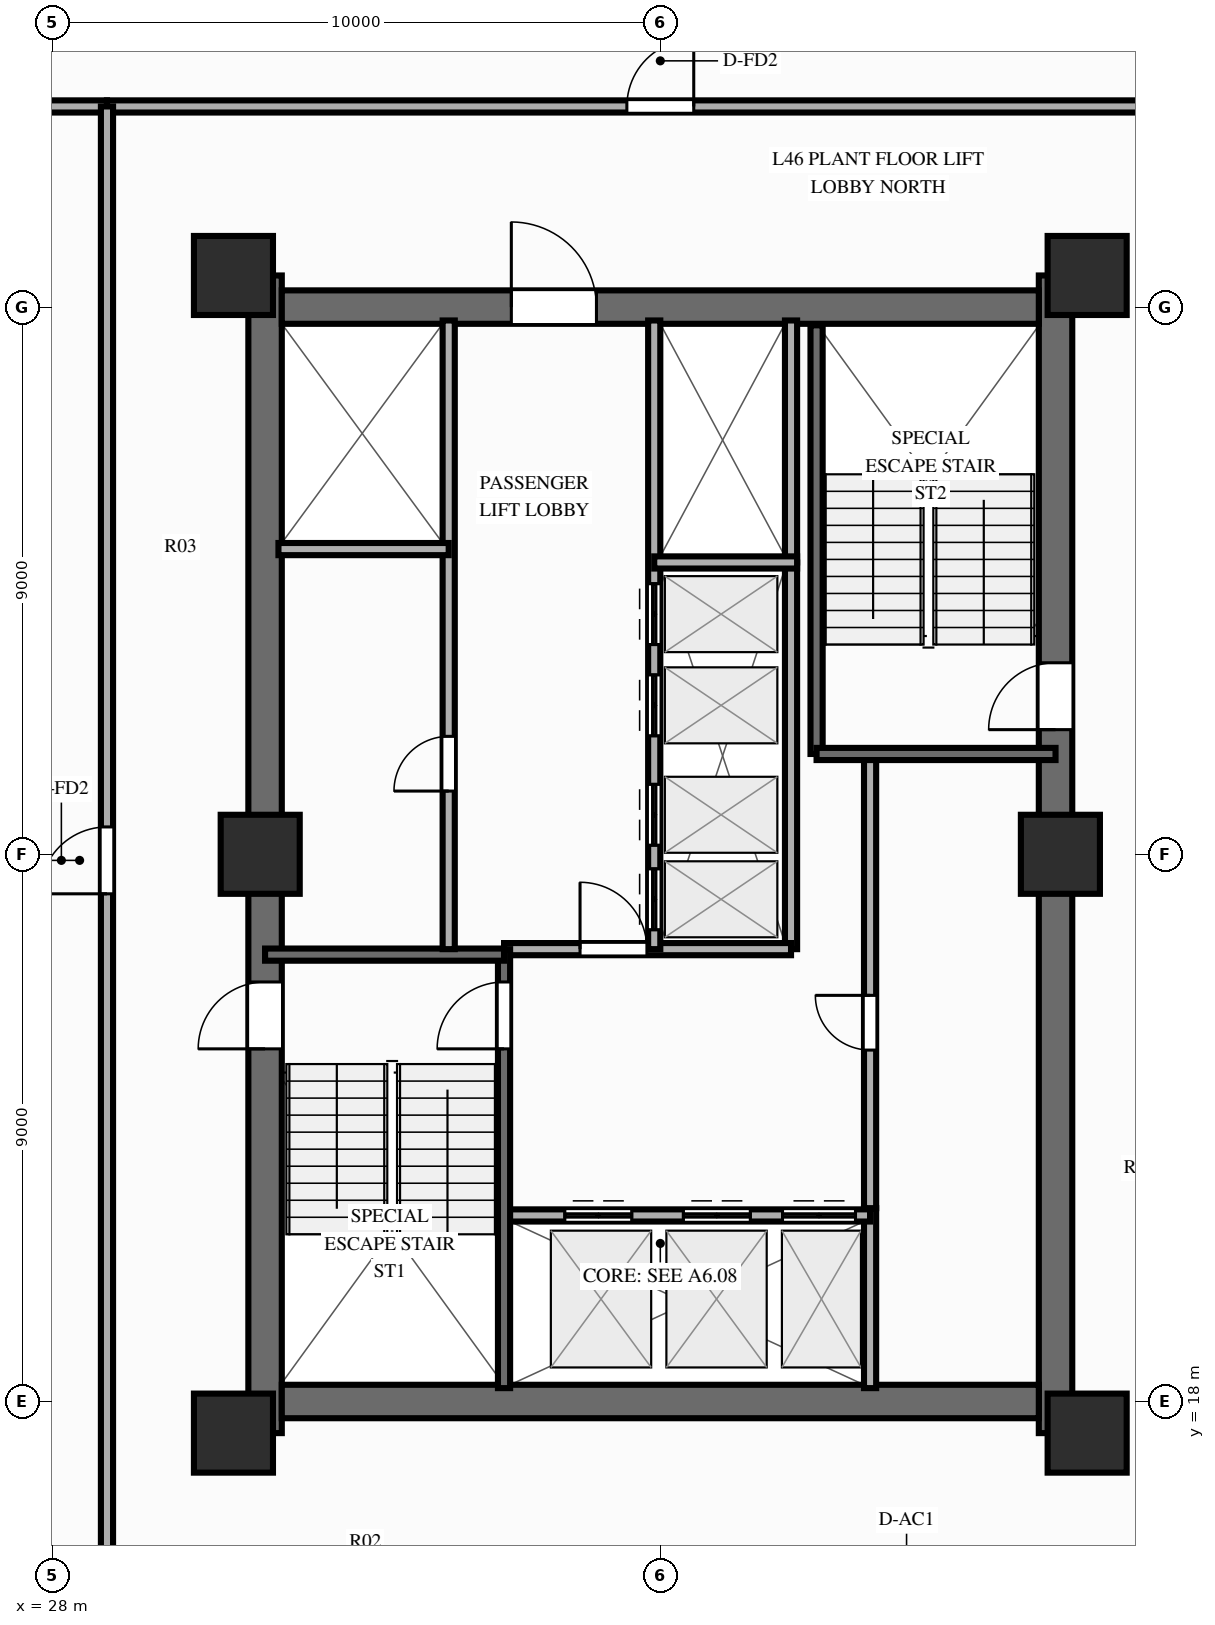
"""IFC4 building model, lengths in metres.
Left out: names, types, materials, properties, quantities, classifications, styles, units other than length and angle.
Written with IfcOpenShell. Run it as: python <this file> out.ifc"""

import sys

from ifc_helpers import new_model, si_unit, direction, frame, frame_2d, origin, origin_2d, place, context, subcontext, project, spatial, rectangle, extrude, source, transform, mapped, element, fill, save


model = new_model("IFC4")
c1 = context("Model", 3, precision=1e-05, world=origin(), true_north=direction((0.0, 1.0)))
c2 = subcontext(c1, "Body", "Model", "MODEL_VIEW")
j1 = project(units=[si_unit("LENGTHUNIT", "METRE"), si_unit("PLANEANGLEUNIT", "RADIAN")], contexts=[c1])
p1 = place(None, origin())
s1 = spatial("IfcSite", under=j1, at=p1, CompositionType="ELEMENT")
p2 = place(p1, origin())
s2 = spatial("IfcBuilding", under=s1, at=p2, CompositionType="ELEMENT")
p3 = place(p2, frame((0.0, 0.0, 144.75)))
s3 = spatial("IfcBuildingStorey", under=s2, at=p3, CompositionType="ELEMENT", Elevation=144.75)
p4 = place(p3, frame((31.5, 17.48, 0.0), z_axis=(0.0, 0.0, 1.0), x_axis=(0.0, 1.0, 0.0)))
e1 = element("IfcWall", 1, at=p4, inside=s3, PredefinedType="SHEAR", context=c2, shape_type="SweptSolid", body=[
    extrude(rectangle(XDim=19.04, YDim=0.55, at=frame_2d((9.52, 0.0))), origin(), (0.0, 0.0, 1.0), 3.95),
])
p5 = place(p4, frame((6.32, 0.0, 0.0)))
e2 = element("IfcOpeningElement", 2, at=p5, cuts=e1, PredefinedType="OPENING", context=c2, shape_type="SweptSolid", body=[
    extrude(rectangle(XDim=1.1, YDim=2.15, at=frame_2d((0.55, 1.075))), frame((0.0, 0.287, 0.0), z_axis=(0.0, -1.0, 0.0), x_axis=(1.0, 0.0, 0.0)), (0.0, 0.0, 1.0), 0.574),
])
p6 = place(p3, frame((44.5, 17.48, 0.0), z_axis=(0.0, 0.0, 1.0), x_axis=(0.0, 1.0, 0.0)))
e3 = element("IfcWall", 3, at=p6, inside=s3, PredefinedType="SHEAR", context=c2, shape_type="SweptSolid", body=[
    extrude(rectangle(XDim=19.04, YDim=0.55, at=frame_2d((9.52, 0.0))), origin(), (0.0, 0.0, 1.0), 3.95),
])
p7 = place(p6, frame((12.67, 0.0, 0.0), z_axis=(0.0, 0.0, 1.0), x_axis=(-1.0, 0.0, 0.0)))
e4 = element("IfcOpeningElement", 4, at=p7, cuts=e3, PredefinedType="OPENING", context=c2, shape_type="SweptSolid", body=[
    extrude(rectangle(XDim=1.1, YDim=2.15, at=frame_2d((0.55, 1.075))), frame((0.0, 0.287, 0.0), z_axis=(0.0, -1.0, 0.0), x_axis=(1.0, 0.0, 0.0)), (0.0, 0.0, 1.0), 0.574),
])
p8 = place(p3, frame((31.775, 18.0, 0.0), z_axis=(0.0, 0.0, 1.0), x_axis=(1.0, 0.0, 0.0)))
e5 = element("IfcWall", 5, at=p8, inside=s3, PredefinedType="SHEAR", context=c2, shape_type="SweptSolid", body=[
    extrude(rectangle(XDim=12.45, YDim=0.55, at=frame_2d((6.225, 0.0))), origin(), (0.0, 0.0, 1.0), 3.95),
])
p9 = place(p3, frame((31.775, 36.0, 0.0), z_axis=(0.0, 0.0, 1.0), x_axis=(1.0, 0.0, 0.0)))
e6 = element("IfcWall", 6, at=p9, inside=s3, PredefinedType="SHEAR", context=c2, shape_type="SweptSolid", body=[
    extrude(rectangle(XDim=12.45, YDim=0.55, at=frame_2d((6.225, 0.0))), origin(), (0.0, 0.0, 1.0), 3.95),
])
p10 = place(p9, frame((5.175, 0.0, 0.0), z_axis=(0.0, 0.0, 1.0), x_axis=(-1.0, 0.0, 0.0)))
e7 = element("IfcOpeningElement", 7, at=p10, cuts=e6, PredefinedType="OPENING", context=c2, shape_type="SweptSolid", body=[
    extrude(rectangle(XDim=1.4, YDim=2.15, at=frame_2d((0.7, 1.075))), frame((0.0, 0.287, 0.0), z_axis=(0.0, -1.0, 0.0), x_axis=(1.0, 0.0, 0.0)), (0.0, 0.0, 1.0), 0.574),
])
m1 = source(origin(), c2, "Body", "SweptSolid", [
    extrude(rectangle(XDim=1.3, YDim=1.3, at=origin_2d()), origin(), (0.0, 0.0, 1.0), 3.95),
])
for number, where, z_axis, x_axis in (
    (8, (30.98, 17.48, 0.0), (0.0, 0.0, 1.0), (1.0, 0.0, 0.0)),
    (9, (45.02, 17.48, 0.0), (0.0, 0.0, 1.0), (1.0, 0.0, 0.0)),
    (10, (30.98, 36.52, 0.0), (0.0, 0.0, 1.0), (1.0, 0.0, 0.0)),
    (11, (45.02, 36.52, 0.0), (0.0, 0.0, 1.0), (1.0, 0.0, 0.0)),
    (12, (31.42, 27.0, 0.0), (0.0, 0.0, 1.0), (1.0, 0.0, 0.0)),
    (13, (44.58, 27.0, 0.0), (0.0, 0.0, 1.0), (1.0, 0.0, 0.0)),
):
    element("IfcColumn", number, at=place(p3, frame(where, z_axis=z_axis, x_axis=x_axis)), inside=s3, PredefinedType="COLUMN", context=c2, shape_type="MappedRepresentation", body=[
        mapped(m1, transform((0.0, 0.0, 0.0), scale=1.0)),
    ])
p11 = place(p3, frame((41.45, 18.22, 0.0), z_axis=(0.0, 0.0, 1.0), x_axis=(0.0, 1.0, 0.0)))
e14 = element("IfcWall", 14, at=p11, inside=s3, PredefinedType="PARTITIONING", context=c2, shape_type="SweptSolid", body=[
    extrude(rectangle(XDim=2.96, YDim=0.2, at=frame_2d((1.48, 0.0))), origin(), (0.0, 0.0, 1.0), 3.61),
])
p12 = place(p3, frame((41.45, 21.18, 0.0), z_axis=(0.0, 0.0, 1.0), x_axis=(0.0, 1.0, 0.0)))
e15 = element("IfcWall", 15, at=p12, inside=s3, PredefinedType="PARTITIONING", context=c2, shape_type="SweptSolid", body=[
    extrude(rectangle(XDim=7.42, YDim=0.2, at=frame_2d((3.71, 0.0))), origin(), (0.0, 0.0, 1.0), 3.61),
])
p13 = place(p12, frame((2.6, 0.0, 0.0)))
e16 = element("IfcOpeningElement", 16, at=p13, cuts=e15, PredefinedType="OPENING", context=c2, shape_type="SweptSolid", body=[
    extrude(rectangle(XDim=0.9, YDim=2.1, at=frame_2d((0.45, 1.05))), frame((0.0, 0.112, 0.0), z_axis=(0.0, -1.0, 0.0), x_axis=(1.0, 0.0, 0.0)), (0.0, 0.0, 1.0), 0.224),
])
p14 = place(p3, frame((40.15, 25.44, 0.0), z_axis=(0.0, 0.0, 1.0), x_axis=(0.0, 1.0, 0.0)))
e17 = element("IfcWall", 17, at=p14, inside=s3, PredefinedType="PARTITIONING", context=c2, shape_type="SweptSolid", body=[
    extrude(rectangle(XDim=6.36, YDim=0.2, at=frame_2d((3.18, 0.0))), origin(), (0.0, 0.0, 1.0), 3.61),
])
p15 = place(p3, frame((40.15, 31.8, 0.0), z_axis=(0.0, 0.0, 1.0), x_axis=(0.0, 1.0, 0.0)))
e18 = element("IfcWall", 18, at=p15, inside=s3, PredefinedType="PARTITIONING", context=c2, shape_type="SweptSolid", body=[
    extrude(rectangle(XDim=3.98, YDim=0.2, at=frame_2d((1.99, 0.0))), origin(), (0.0, 0.0, 1.0), 3.61),
])
p16 = place(p3, frame((35.43, 21.06, 0.0), z_axis=(0.0, 0.0, 1.0), x_axis=(1.0, 0.0, 0.0)))
e19 = element("IfcWall", 19, at=p16, inside=s3, PredefinedType="PARTITIONING", context=c2, shape_type="SweptSolid", body=[
    extrude(rectangle(XDim=6.02, YDim=0.2, at=frame_2d((3.01, 0.0))), origin(), (0.0, 0.0, 1.0), 3.61),
])
p17 = place(p16, frame((1.0, 0.0, 0.0)))
e20 = element("IfcOpeningElement", 20, at=p17, cuts=e19, PredefinedType="OPENING", context=c2, shape_type="SweptSolid", body=[
    extrude(rectangle(XDim=1.1, YDim=2.15, at=frame_2d((0.55, 1.075))), frame((0.0, 0.112, 0.0), z_axis=(0.0, -1.0, 0.0), x_axis=(1.0, 0.0, 0.0)), (0.0, 0.0, 1.0), 0.224),
])
p18 = place(p16, frame((2.95, 0.0, 0.0)))
e21 = element("IfcOpeningElement", 21, at=p18, cuts=e19, PredefinedType="OPENING", context=c2, shape_type="SweptSolid", body=[
    extrude(rectangle(XDim=1.1, YDim=2.15, at=frame_2d((0.55, 1.075))), frame((0.0, 0.112, 0.0), z_axis=(0.0, -1.0, 0.0), x_axis=(1.0, 0.0, 0.0)), (0.0, 0.0, 1.0), 0.224),
])
p19 = place(p16, frame((4.58, 0.0, 0.0)))
e22 = element("IfcOpeningElement", 22, at=p19, cuts=e19, PredefinedType="OPENING", context=c2, shape_type="SweptSolid", body=[
    extrude(rectangle(XDim=1.2, YDim=2.15, at=frame_2d((0.6, 1.075))), frame((0.0, 0.112, 0.0), z_axis=(0.0, -1.0, 0.0), x_axis=(1.0, 0.0, 0.0)), (0.0, 0.0, 1.0), 0.224),
])
p20 = place(p3, frame((35.43, 25.44, 0.0), z_axis=(0.0, 0.0, 1.0), x_axis=(1.0, 0.0, 0.0)))
e23 = element("IfcWall", 23, at=p20, inside=s3, PredefinedType="PARTITIONING", context=c2, shape_type="SweptSolid", body=[
    extrude(rectangle(XDim=4.72, YDim=0.2, at=frame_2d((2.36, 0.0))), origin(), (0.0, 0.0, 1.0), 3.61),
])
p21 = place(p20, frame((1.25, 0.0, 0.0)))
e24 = element("IfcOpeningElement", 24, at=p21, cuts=e23, PredefinedType="OPENING", context=c2, shape_type="SweptSolid", body=[
    extrude(rectangle(XDim=1.1, YDim=2.15, at=frame_2d((0.55, 1.075))), frame((0.0, 0.112, 0.0), z_axis=(0.0, -1.0, 0.0), x_axis=(1.0, 0.0, 0.0)), (0.0, 0.0, 1.0), 0.224),
])
p22 = place(p3, frame((35.43, 18.22, 0.0), z_axis=(0.0, 0.0, 1.0), x_axis=(0.0, 1.0, 0.0)))
e25 = element("IfcWall", 25, at=p22, inside=s3, PredefinedType="SOLIDWALL", context=c2, shape_type="SweptSolid", body=[
    extrude(rectangle(XDim=7.22, YDim=0.2, at=frame_2d((3.61, 0.0))), origin(), (0.0, 0.0, 1.0), 3.69),
])
p23 = place(p22, frame((6.68, 0.0, 0.0), z_axis=(0.0, 0.0, 1.0), x_axis=(-1.0, 0.0, 0.0)))
e26 = element("IfcOpeningElement", 26, at=p23, cuts=e25, PredefinedType="OPENING", context=c2, shape_type="SweptSolid", body=[
    extrude(rectangle(XDim=1.1, YDim=2.15, at=frame_2d((0.55, 1.075))), frame((0.0, 0.112, 0.0), z_axis=(0.0, -1.0, 0.0), x_axis=(1.0, 0.0, 0.0)), (0.0, 0.0, 1.0), 0.224),
])
p24 = place(p3, frame((31.5, 25.35, 0.0), z_axis=(0.0, 0.0, 1.0), x_axis=(1.0, 0.0, 0.0)))
e27 = element("IfcWall", 27, at=p24, inside=s3, PredefinedType="SOLIDWALL", context=c2, shape_type="SweptSolid", body=[
    extrude(rectangle(XDim=3.93, YDim=0.2, at=frame_2d((1.965, 0.0))), origin(), (0.0, 0.0, 1.0), 3.69),
])
p25 = place(p3, frame((40.57, 28.65, 0.0), z_axis=(0.0, 0.0, 1.0), x_axis=(0.0, 1.0, 0.0)))
e28 = element("IfcWall", 28, at=p25, inside=s3, PredefinedType="SOLIDWALL", context=c2, shape_type="SweptSolid", body=[
    extrude(rectangle(XDim=7.05, YDim=0.2, at=frame_2d((3.525, 0.0))), origin(), (0.0, 0.0, 1.0), 3.69),
])
p26 = place(p3, frame((40.57, 28.65, 0.0), z_axis=(0.0, 0.0, 1.0), x_axis=(1.0, 0.0, 0.0)))
e29 = element("IfcWall", 29, at=p26, inside=s3, PredefinedType="SOLIDWALL", context=c2, shape_type="SweptSolid", body=[
    extrude(rectangle(XDim=3.93, YDim=0.2, at=frame_2d((1.965, 0.0))), origin(), (0.0, 0.0, 1.0), 3.69),
])
p27 = place(p3, frame((34.52, 25.44, 0.0), z_axis=(0.0, 0.0, 1.0), x_axis=(0.0, 1.0, 0.0)))
e30 = element("IfcWall", 30, at=p27, inside=s3, PredefinedType="PARTITIONING", context=c2, shape_type="SweptSolid", body=[
    extrude(rectangle(XDim=10.34, YDim=0.2, at=frame_2d((5.17, 0.0))), origin(), (0.0, 0.0, 1.0), 3.61),
])
p28 = place(p27, frame((2.6, 0.0, 0.0)))
e31 = element("IfcOpeningElement", 31, at=p28, cuts=e30, PredefinedType="OPENING", context=c2, shape_type="SweptSolid", body=[
    extrude(rectangle(XDim=0.9, YDim=2.1, at=frame_2d((0.45, 1.05))), frame((0.0, 0.112, 0.0), z_axis=(0.0, -1.0, 0.0), x_axis=(1.0, 0.0, 0.0)), (0.0, 0.0, 1.0), 0.224),
])
p29 = place(p3, frame((31.72, 32.02, 0.0), z_axis=(0.0, 0.0, 1.0), x_axis=(1.0, 0.0, 0.0)))
e32 = element("IfcWall", 32, at=p29, inside=s3, PredefinedType="PARTITIONING", context=c2, shape_type="SweptSolid", body=[
    extrude(rectangle(XDim=2.8, YDim=0.2, at=frame_2d((1.4, 0.0))), origin(), (0.0, 0.0, 1.0), 3.61),
])
p30 = place(p3, frame((37.9, 25.44, 0.0), z_axis=(0.0, 0.0, 1.0), x_axis=(0.0, 1.0, 0.0)))
e33 = element("IfcWall", 33, at=p30, inside=s3, PredefinedType="PARTITIONING", context=c2, shape_type="SweptSolid", body=[
    extrude(rectangle(XDim=10.34, YDim=0.2, at=frame_2d((5.17, 0.0))), origin(), (0.0, 0.0, 1.0), 3.61),
])
p31 = place(p30, frame((0.32, 0.0, 0.0)))
e34 = element("IfcOpeningElement", 34, at=p31, cuts=e33, PredefinedType="OPENING", context=c2, shape_type="SweptSolid", body=[
    extrude(rectangle(XDim=1.0, YDim=2.15, at=frame_2d((0.5, 1.075))), frame((0.0, 0.112, 0.0), z_axis=(0.0, -1.0, 0.0), x_axis=(1.0, 0.0, 0.0)), (0.0, 0.0, 1.0), 0.224),
])
p32 = place(p30, frame((1.71, 0.0, 0.0)))
e35 = element("IfcOpeningElement", 35, at=p32, cuts=e33, PredefinedType="OPENING", context=c2, shape_type="SweptSolid", body=[
    extrude(rectangle(XDim=1.0, YDim=2.15, at=frame_2d((0.5, 1.075))), frame((0.0, 0.112, 0.0), z_axis=(0.0, -1.0, 0.0), x_axis=(1.0, 0.0, 0.0)), (0.0, 0.0, 1.0), 0.224),
])
p33 = place(p30, frame((3.51, 0.0, 0.0)))
e36 = element("IfcOpeningElement", 36, at=p33, cuts=e33, PredefinedType="OPENING", context=c2, shape_type="SweptSolid", body=[
    extrude(rectangle(XDim=1.0, YDim=2.15, at=frame_2d((0.5, 1.075))), frame((0.0, 0.112, 0.0), z_axis=(0.0, -1.0, 0.0), x_axis=(1.0, 0.0, 0.0)), (0.0, 0.0, 1.0), 0.224),
])
p34 = place(p30, frame((5.01, 0.0, 0.0)))
e37 = element("IfcOpeningElement", 37, at=p34, cuts=e33, PredefinedType="OPENING", context=c2, shape_type="SweptSolid", body=[
    extrude(rectangle(XDim=1.0, YDim=2.15, at=frame_2d((0.5, 1.075))), frame((0.0, 0.112, 0.0), z_axis=(0.0, -1.0, 0.0), x_axis=(1.0, 0.0, 0.0)), (0.0, 0.0, 1.0), 0.224),
])
p35 = place(p3, frame((37.9, 31.8, 0.0), z_axis=(0.0, 0.0, 1.0), x_axis=(1.0, 0.0, 0.0)))
e38 = element("IfcWall", 38, at=p35, inside=s3, PredefinedType="PARTITIONING", context=c2, shape_type="SweptSolid", body=[
    extrude(rectangle(XDim=2.35, YDim=0.2, at=frame_2d((1.175, 0.0))), origin(), (0.0, 0.0, 1.0), 3.61),
])
p36 = place(p3, frame((16.2, 39.3, 0.0), z_axis=(0.0, 0.0, 1.0), x_axis=(1.0, 0.0, 0.0)))
e39 = element("IfcWall", 39, at=p36, inside=s3, PredefinedType="PARTITIONING", context=c2, shape_type="SweptSolid", body=[
    extrude(rectangle(XDim=12.7, YDim=0.2, at=frame_2d((6.35, 0.0))), origin(), (0.0, 0.0, 1.0), 3.61),
])
p37 = place(p3, frame((28.9, 39.3, 0.0), z_axis=(0.0, 0.0, 1.0), x_axis=(1.0, 0.0, 0.0)))
e40 = element("IfcWall", 40, at=p37, inside=s3, PredefinedType="PARTITIONING", context=c2, shape_type="SweptSolid", body=[
    extrude(rectangle(XDim=18.2, YDim=0.2, at=frame_2d((9.1, 0.0))), origin(), (0.0, 0.0, 1.0), 3.61),
])
p38 = place(p37, frame((8.55, 0.0, 0.0)))
e41 = element("IfcOpeningElement", 41, at=p38, cuts=e40, PredefinedType="OPENING", context=c2, shape_type="SweptSolid", body=[
    extrude(rectangle(XDim=1.1, YDim=2.15, at=frame_2d((0.55, 1.075))), frame((0.0, 0.112, 0.0), z_axis=(0.0, -1.0, 0.0), x_axis=(1.0, 0.0, 0.0)), (0.0, 0.0, 1.0), 0.224),
])
p39 = place(p3, frame((28.9, 14.5, 0.0), z_axis=(0.0, 0.0, 1.0), x_axis=(0.0, 1.0, 0.0)))
e42 = element("IfcWall", 42, at=p39, inside=s3, PredefinedType="PARTITIONING", context=c2, shape_type="SweptSolid", body=[
    extrude(rectangle(XDim=24.8, YDim=0.2, at=frame_2d((12.4, 0.0))), origin(), (0.0, 0.0, 1.0), 3.61),
])
p40 = place(p39, frame((11.85, 0.0, 0.0)))
e43 = element("IfcOpeningElement", 43, at=p40, cuts=e42, PredefinedType="OPENING", context=c2, shape_type="SweptSolid", body=[
    extrude(rectangle(XDim=1.1, YDim=2.15, at=frame_2d((0.55, 1.075))), frame((0.0, 0.112, 0.0), z_axis=(0.0, -1.0, 0.0), x_axis=(1.0, 0.0, 0.0)), (0.0, 0.0, 1.0), 0.224),
])
m2 = source(origin(), c2, "Body", "SweptSolid", [
    extrude(rectangle(XDim=1.1, YDim=2.15, at=frame_2d((0.55, 1.075))), frame((0.0, 0.025, 0.0), z_axis=(0.0, -1.0, 0.0), x_axis=(1.0, 0.0, 0.0)), (0.0, 0.0, 1.0), 0.05),
])
p41 = place(p5, origin())
e44 = element("IfcDoor", 44, at=p41, inside=s3, OperationType="SINGLE_SWING_LEFT", PredefinedType="DOOR", context=c2, shape_type="MappedRepresentation", body=[
    mapped(m2, transform((0.0, 0.0, 0.0), scale=1.0)),
])
fill(e2, e44)
p42 = place(p7, origin())
e45 = element("IfcDoor", 45, at=p42, inside=s3, OperationType="SINGLE_SWING_RIGHT", PredefinedType="DOOR", context=c2, shape_type="MappedRepresentation", body=[
    mapped(m2, transform((0.0, 0.0, 0.0), scale=1.0)),
])
fill(e4, e45)
m3 = source(origin(), c2, "Body", "SweptSolid", [
    extrude(rectangle(XDim=1.4, YDim=2.15, at=frame_2d((0.7, 1.075))), frame((0.0, 0.025, 0.0), z_axis=(0.0, -1.0, 0.0), x_axis=(1.0, 0.0, 0.0)), (0.0, 0.0, 1.0), 0.05),
])
p43 = place(p10, origin())
e46 = element("IfcDoor", 46, at=p43, inside=s3, OperationType="SINGLE_SWING_RIGHT", PredefinedType="DOOR", context=c2, shape_type="MappedRepresentation", body=[
    mapped(m3, transform((0.0, 0.0, 0.0), scale=1.0)),
])
fill(e7, e46)
m4 = source(origin(), c2, "Body", "SweptSolid", [
    extrude(rectangle(XDim=0.9, YDim=2.1, at=frame_2d((0.45, 1.05))), frame((0.0, 0.025, 0.0), z_axis=(0.0, -1.0, 0.0), x_axis=(1.0, 0.0, 0.0)), (0.0, 0.0, 1.0), 0.05),
])
p44 = place(p13, origin())
e47 = element("IfcDoor", 47, at=p44, inside=s3, OperationType="SINGLE_SWING_RIGHT", PredefinedType="DOOR", context=c2, shape_type="MappedRepresentation", body=[
    mapped(m4, transform((0.0, 0.0, 0.0), scale=1.0)),
])
fill(e16, e47)
p45 = place(p17, origin())
e48 = element("IfcDoor", 48, at=p45, inside=s3, OperationType="DOUBLE_DOOR_SLIDING", PredefinedType="DOOR", context=c2, shape_type="MappedRepresentation", body=[
    mapped(m2, transform((0.0, 0.0, 0.0), scale=1.0)),
])
fill(e20, e48)
p46 = place(p18, origin())
e49 = element("IfcDoor", 49, at=p46, inside=s3, OperationType="DOUBLE_DOOR_SLIDING", PredefinedType="DOOR", context=c2, shape_type="MappedRepresentation", body=[
    mapped(m2, transform((0.0, 0.0, 0.0), scale=1.0)),
])
fill(e21, e49)
m5 = source(origin(), c2, "Body", "SweptSolid", [
    extrude(rectangle(XDim=1.2, YDim=2.15, at=frame_2d((0.6, 1.075))), frame((0.0, 0.025, 0.0), z_axis=(0.0, -1.0, 0.0), x_axis=(1.0, 0.0, 0.0)), (0.0, 0.0, 1.0), 0.05),
])
p47 = place(p19, origin())
e50 = element("IfcDoor", 50, at=p47, inside=s3, OperationType="DOUBLE_DOOR_SLIDING", PredefinedType="DOOR", context=c2, shape_type="MappedRepresentation", body=[
    mapped(m5, transform((0.0, 0.0, 0.0), scale=1.0)),
])
fill(e22, e50)
p48 = place(p21, origin())
e51 = element("IfcDoor", 51, at=p48, inside=s3, OperationType="SINGLE_SWING_LEFT", PredefinedType="DOOR", context=c2, shape_type="MappedRepresentation", body=[
    mapped(m2, transform((0.0, 0.0, 0.0), scale=1.0)),
])
fill(e24, e51)
p49 = place(p23, origin())
e52 = element("IfcDoor", 52, at=p49, inside=s3, OperationType="SINGLE_SWING_RIGHT", PredefinedType="DOOR", context=c2, shape_type="MappedRepresentation", body=[
    mapped(m2, transform((0.0, 0.0, 0.0), scale=1.0)),
])
fill(e26, e52)
p50 = place(p28, origin())
e53 = element("IfcDoor", 53, at=p50, inside=s3, OperationType="SINGLE_SWING_LEFT", PredefinedType="DOOR", context=c2, shape_type="MappedRepresentation", body=[
    mapped(m4, transform((0.0, 0.0, 0.0), scale=1.0)),
])
fill(e31, e53)
m6 = source(origin(), c2, "Body", "SweptSolid", [
    extrude(rectangle(XDim=1.0, YDim=2.15, at=frame_2d((0.5, 1.075))), frame((0.0, 0.025, 0.0), z_axis=(0.0, -1.0, 0.0), x_axis=(1.0, 0.0, 0.0)), (0.0, 0.0, 1.0), 0.05),
])
p51 = place(p31, origin())
e54 = element("IfcDoor", 54, at=p51, inside=s3, OperationType="DOUBLE_DOOR_SLIDING", PredefinedType="DOOR", context=c2, shape_type="MappedRepresentation", body=[
    mapped(m6, transform((0.0, 0.0, 0.0), scale=1.0)),
])
fill(e34, e54)
p52 = place(p32, origin())
e55 = element("IfcDoor", 55, at=p52, inside=s3, OperationType="DOUBLE_DOOR_SLIDING", PredefinedType="DOOR", context=c2, shape_type="MappedRepresentation", body=[
    mapped(m6, transform((0.0, 0.0, 0.0), scale=1.0)),
])
fill(e35, e55)
p53 = place(p33, origin())
e56 = element("IfcDoor", 56, at=p53, inside=s3, OperationType="DOUBLE_DOOR_SLIDING", PredefinedType="DOOR", context=c2, shape_type="MappedRepresentation", body=[
    mapped(m6, transform((0.0, 0.0, 0.0), scale=1.0)),
])
fill(e36, e56)
p54 = place(p34, origin())
e57 = element("IfcDoor", 57, at=p54, inside=s3, OperationType="DOUBLE_DOOR_SLIDING", PredefinedType="DOOR", context=c2, shape_type="MappedRepresentation", body=[
    mapped(m6, transform((0.0, 0.0, 0.0), scale=1.0)),
])
fill(e37, e57)
p55 = place(p38, origin())
e58 = element("IfcDoor", 58, at=p55, inside=s3, OperationType="SINGLE_SWING_RIGHT", PredefinedType="DOOR", context=c2, shape_type="MappedRepresentation", body=[
    mapped(m2, transform((0.0, 0.0, 0.0), scale=1.0)),
])
fill(e41, e58)
p56 = place(p40, origin())
e59 = element("IfcDoor", 59, at=p56, inside=s3, OperationType="SINGLE_SWING_LEFT", PredefinedType="DOOR", context=c2, shape_type="MappedRepresentation", body=[
    mapped(m2, transform((0.0, 0.0, 0.0), scale=1.0)),
])
fill(e43, e59)
save(model, sys.argv[1])
